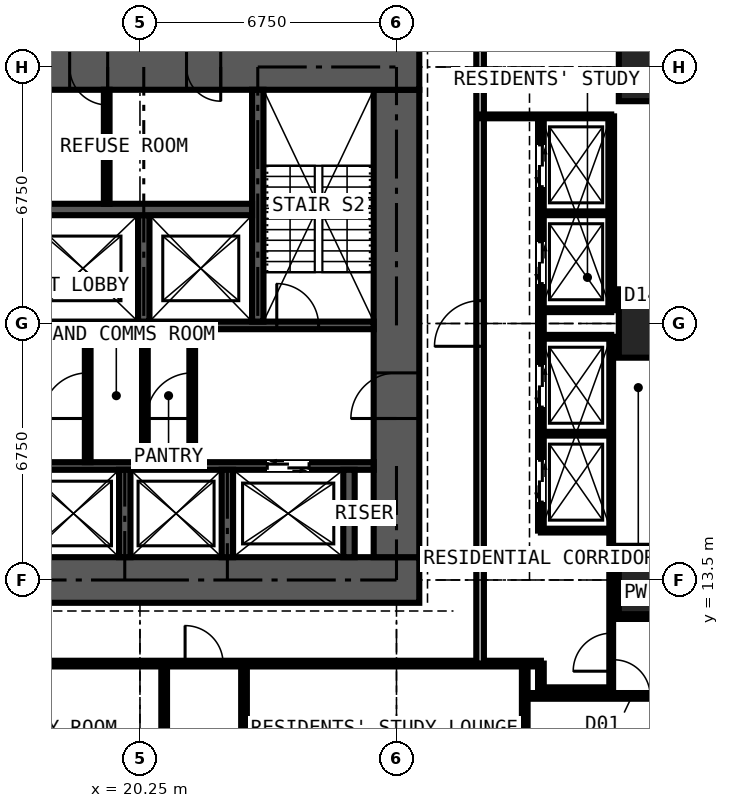
"""IFC4 building model, lengths in metres.
Left out: names, types, materials, properties, quantities, classifications, styles, units other than length and angle.
Written with IfcOpenShell. Run it as: python <this file> out.ifc"""

import sys

from ifc_helpers import new_model, si_unit, direction, frame, frame_2d, origin, origin_2d, place, context, subcontext, project, spatial, rectangle, extrude, element, fill, save


model = new_model("IFC4")
c1 = context("Model", 3, precision=1e-05, world=origin(), true_north=direction((0.0, 1.0)))
c2 = subcontext(c1, "Body", "Model", "MODEL_VIEW")
j1 = project(units=[si_unit("LENGTHUNIT", "METRE"), si_unit("PLANEANGLEUNIT", "RADIAN")], contexts=[c1])
p1 = place(None, origin())
s1 = spatial("IfcSite", under=j1, at=p1, CompositionType="ELEMENT")
p2 = place(p1, origin())
s2 = spatial("IfcBuilding", under=s1, at=p2, CompositionType="ELEMENT")
p3 = place(p2, frame((0.0, 0.0, 50.4)))
s3 = spatial("IfcBuildingStorey", under=s2, at=p3, CompositionType="ELEMENT", Elevation=50.4)
for number, where, z_axis, x_axis in (
    (1, (33.75, 13.5, 0.0), (0.0, 0.0, 1.0), (1.0, 0.0, 0.0)),
    (2, (33.75, 20.25, 0.0), (0.0, 0.0, 1.0), (1.0, 0.0, 0.0)),
    (3, (33.75, 27.0, 0.0), (0.0, 0.0, 1.0), (1.0, 0.0, 0.0)),
):
    element("IfcColumn", number, at=place(p3, frame(where, z_axis=z_axis, x_axis=x_axis)), inside=s3, PredefinedType="COLUMN", context=c2, shape_type="SweptSolid", body=[
        extrude(rectangle(XDim=1.8, YDim=1.8, at=origin_2d()), origin(), (0.0, 0.0, 1.0), 3.6),
    ])
p4 = place(p3, frame((12.9, 13.5, 0.0), z_axis=(0.0, 0.0, 1.0), x_axis=(1.0, 0.0, 0.0)))
e4 = element("IfcWall", 4, at=p4, inside=s3, PredefinedType="SHEAR", context=c2, shape_type="SweptSolid", body=[
    extrude(rectangle(XDim=14.7, YDim=1.2, at=frame_2d((7.35, 0.0))), origin(), (0.0, 0.0, 1.0), 3.6),
])
p5 = place(p3, frame((27.0, 14.1, 0.0), z_axis=(0.0, 0.0, 1.0), x_axis=(0.0, 1.0, 0.0)))
e5 = element("IfcWall", 5, at=p5, inside=s3, PredefinedType="SHEAR", context=c2, shape_type="SweptSolid", body=[
    extrude(rectangle(XDim=12.3, YDim=1.2, at=frame_2d((6.15, 0.0))), origin(), (0.0, 0.0, 1.0), 3.6),
])
p6 = place(p5, frame((3.65, 0.0, 0.0)))
e6 = element("IfcOpeningElement", 6, at=p6, cuts=e5, PredefinedType="OPENING", context=c2, shape_type="SweptSolid", body=[
    extrude(rectangle(XDim=1.2, YDim=2.2, at=frame_2d((0.6, 1.1))), frame((0.0, 0.61, 0.0), z_axis=(0.0, -1.0, 0.0), x_axis=(1.0, 0.0, 0.0)), (0.0, 0.0, 1.0), 1.22),
])
p7 = place(p3, frame((27.6, 27.0, 0.0), z_axis=(0.0, 0.0, 1.0), x_axis=(-1.0, 0.0, 0.0)))
e7 = element("IfcWall", 7, at=p7, inside=s3, PredefinedType="SHEAR", context=c2, shape_type="SweptSolid", body=[
    extrude(rectangle(XDim=14.7, YDim=1.2, at=frame_2d((7.35, 0.0))), origin(), (0.0, 0.0, 1.0), 3.6),
])
p8 = place(p7, frame((5.225, 0.0, 0.0)))
e8 = element("IfcOpeningElement", 8, at=p8, cuts=e7, PredefinedType="OPENING", context=c2, shape_type="SweptSolid", body=[
    extrude(rectangle(XDim=0.9, YDim=2.2, at=frame_2d((0.45, 1.1))), frame((0.0, 0.61, 0.0), z_axis=(0.0, -1.0, 0.0), x_axis=(1.0, 0.0, 0.0)), (0.0, 0.0, 1.0), 1.22),
])
p9 = place(p7, frame((8.2, 0.0, 0.0)))
e9 = element("IfcOpeningElement", 9, at=p9, cuts=e7, PredefinedType="OPENING", context=c2, shape_type="SweptSolid", body=[
    extrude(rectangle(XDim=1.0, YDim=2.2, at=frame_2d((0.5, 1.1))), frame((0.0, 0.61, 0.0), z_axis=(0.0, -1.0, 0.0), x_axis=(1.0, 0.0, 0.0)), (0.0, 0.0, 1.0), 1.22),
])
p10 = place(p3, frame((14.1, 16.5, 0.0), z_axis=(0.0, 0.0, 1.0), x_axis=(1.0, 0.0, 0.0)))
e10 = element("IfcWall", 10, at=p10, inside=s3, PredefinedType="SHEAR", context=c2, shape_type="SweptSolid", body=[
    extrude(rectangle(XDim=12.3, YDim=0.2, at=frame_2d((6.15, 0.0))), origin(), (0.0, 0.0, 1.0), 3.6),
])
p11 = place(p10, frame((0.9, 0.0, 0.0)))
e11 = element("IfcOpeningElement", 11, at=p11, cuts=e10, PredefinedType="OPENING", context=c2, shape_type="SweptSolid", body=[
    extrude(rectangle(XDim=1.1, YDim=2.2, at=frame_2d((0.55, 1.1))), frame((0.0, 0.11, 0.0), z_axis=(0.0, -1.0, 0.0), x_axis=(1.0, 0.0, 0.0)), (0.0, 0.0, 1.0), 0.22),
])
p12 = place(p10, frame((9.5, 0.0, 0.0)))
e12 = element("IfcOpeningElement", 12, at=p12, cuts=e10, PredefinedType="OPENING", context=c2, shape_type="SweptSolid", body=[
    extrude(rectangle(XDim=1.1, YDim=2.2, at=frame_2d((0.55, 1.1))), frame((0.0, 0.11, 0.0), z_axis=(0.0, -1.0, 0.0), x_axis=(1.0, 0.0, 0.0)), (0.0, 0.0, 1.0), 0.22),
])
p13 = place(p3, frame((14.1, 20.2, 0.0), z_axis=(0.0, 0.0, 1.0), x_axis=(1.0, 0.0, 0.0)))
e13 = element("IfcWall", 13, at=p13, inside=s3, PredefinedType="SHEAR", context=c2, shape_type="SweptSolid", body=[
    extrude(rectangle(XDim=12.3, YDim=0.2, at=frame_2d((6.15, 0.0))), origin(), (0.0, 0.0, 1.0), 3.6),
])
p14 = place(p13, frame((0.35, 0.0, 0.0)))
e14 = element("IfcOpeningElement", 14, at=p14, cuts=e13, PredefinedType="OPENING", context=c2, shape_type="SweptSolid", body=[
    extrude(rectangle(XDim=1.1, YDim=2.2, at=frame_2d((0.55, 1.1))), frame((0.0, 0.11, 0.0), z_axis=(0.0, -1.0, 0.0), x_axis=(1.0, 0.0, 0.0)), (0.0, 0.0, 1.0), 0.22),
])
p15 = place(p13, frame((9.75, 0.0, 0.0)))
e15 = element("IfcOpeningElement", 15, at=p15, cuts=e13, PredefinedType="OPENING", context=c2, shape_type="SweptSolid", body=[
    extrude(rectangle(XDim=1.1, YDim=2.2, at=frame_2d((0.55, 1.1))), frame((0.0, 0.11, 0.0), z_axis=(0.0, -1.0, 0.0), x_axis=(1.0, 0.0, 0.0)), (0.0, 0.0, 1.0), 0.22),
])
p16 = place(p3, frame((23.35, 20.3, 0.0), z_axis=(0.0, 0.0, 1.0), x_axis=(0.0, 1.0, 0.0)))
e16 = element("IfcWall", 16, at=p16, inside=s3, PredefinedType="SHEAR", context=c2, shape_type="SweptSolid", body=[
    extrude(rectangle(XDim=6.1, YDim=0.3, at=frame_2d((3.05, 0.0))), origin(), (0.0, 0.0, 1.0), 3.6),
])
p17 = place(p3, frame((20.35, 20.3, 0.0), z_axis=(0.0, 0.0, 1.0), x_axis=(0.0, 1.0, 0.0)))
e17 = element("IfcWall", 17, at=p17, inside=s3, PredefinedType="SHEAR", context=c2, shape_type="SweptSolid", body=[
    extrude(rectangle(XDim=2.8, YDim=0.3, at=frame_2d((1.4, 0.0))), origin(), (0.0, 0.0, 1.0), 3.6),
])
p18 = place(p3, frame((17.3, 23.25, 0.0), z_axis=(0.0, 0.0, 1.0), x_axis=(1.0, 0.0, 0.0)))
e18 = element("IfcWall", 18, at=p18, inside=s3, PredefinedType="SHEAR", context=c2, shape_type="SweptSolid", body=[
    extrude(rectangle(XDim=5.9, YDim=0.3, at=frame_2d((2.95, 0.0))), origin(), (0.0, 0.0, 1.0), 3.6),
])
for number, where, z_axis, x_axis in (
    (19, (19.85, 14.1, 0.0), (0.0, 0.0, 1.0), (0.0, 1.0, 0.0)),
    (20, (22.55, 14.1, 0.0), (0.0, 0.0, 1.0), (0.0, 1.0, 0.0)),
    (21, (25.75, 14.1, 0.0), (0.0, 0.0, 1.0), (0.0, 1.0, 0.0)),
):
    element("IfcWall", number, at=place(p3, frame(where, z_axis=z_axis, x_axis=x_axis)), inside=s3, PredefinedType="SHEAR", context=c2, shape_type="SweptSolid", body=[
        extrude(rectangle(XDim=2.3, YDim=0.3, at=frame_2d((1.15, 0.0))), origin(), (0.0, 0.0, 1.0), 3.6),
    ])
p19 = place(p3, frame((18.875, 16.6, 0.0), z_axis=(0.0, 0.0, 1.0), x_axis=(0.0, 1.0, 0.0)))
e22 = element("IfcWall", 22, at=p19, inside=s3, PredefinedType="PARTITIONING", context=c2, shape_type="SweptSolid", body=[
    extrude(rectangle(XDim=3.5, YDim=0.15, at=frame_2d((1.75, 0.0))), origin(), (0.0, 0.0, 1.0), 3.375),
])
p20 = place(p19, frame((1.15, 0.0, 0.0)))
e23 = element("IfcOpeningElement", 23, at=p20, cuts=e22, PredefinedType="OPENING", context=c2, shape_type="SweptSolid", body=[
    extrude(rectangle(XDim=1.2, YDim=2.2, at=frame_2d((0.6, 1.1))), frame((0.0, 0.085, 0.0), z_axis=(0.0, -1.0, 0.0), x_axis=(1.0, 0.0, 0.0)), (0.0, 0.0, 1.0), 0.17),
])
p21 = place(p3, frame((21.625, 16.6, 0.0), z_axis=(0.0, 0.0, 1.0), x_axis=(0.0, 1.0, 0.0)))
e24 = element("IfcWall", 24, at=p21, inside=s3, PredefinedType="PARTITIONING", context=c2, shape_type="SweptSolid", body=[
    extrude(rectangle(XDim=3.5, YDim=0.15, at=frame_2d((1.75, 0.0))), origin(), (0.0, 0.0, 1.0), 3.375),
])
p22 = place(p21, frame((1.15, 0.0, 0.0)))
e25 = element("IfcOpeningElement", 25, at=p22, cuts=e24, PredefinedType="OPENING", context=c2, shape_type="SweptSolid", body=[
    extrude(rectangle(XDim=1.2, YDim=2.2, at=frame_2d((0.6, 1.1))), frame((0.0, 0.085, 0.0), z_axis=(0.0, -1.0, 0.0), x_axis=(1.0, 0.0, 0.0)), (0.0, 0.0, 1.0), 0.17),
])
p23 = place(p3, frame((20.38, 16.6, 0.0), z_axis=(0.0, 0.0, 1.0), x_axis=(0.0, 1.0, 0.0)))
e26 = element("IfcWall", 26, at=p23, inside=s3, PredefinedType="PARTITIONING", context=c2, shape_type="SweptSolid", body=[
    extrude(rectangle(XDim=3.5, YDim=0.15, at=frame_2d((1.75, 0.0))), origin(), (0.0, 0.0, 1.0), 3.375),
])
p24 = place(p3, frame((19.375, 23.4, 0.0), z_axis=(0.0, 0.0, 1.0), x_axis=(0.0, 1.0, 0.0)))
e27 = element("IfcWall", 27, at=p24, inside=s3, PredefinedType="PARTITIONING", context=c2, shape_type="SweptSolid", body=[
    extrude(rectangle(XDim=3.0, YDim=0.15, at=frame_2d((1.5, 0.0))), origin(), (0.0, 0.0, 1.0), 3.375),
])
p25 = place(p3, frame((10.125, 11.3, 0.0), z_axis=(0.0, 0.0, 1.0), x_axis=(1.0, 0.0, 0.0)))
e28 = element("IfcWall", 28, at=p25, inside=s3, PredefinedType="PARTITIONING", context=c2, shape_type="SweptSolid", body=[
    extrude(rectangle(XDim=20.675, YDim=0.15, at=frame_2d((10.337, 0.0))), origin(), (0.0, 0.0, 1.0), 3.375),
])
p26 = place(p25, frame((1.775, 0.0, 0.0)))
e29 = element("IfcOpeningElement", 29, at=p26, cuts=e28, PredefinedType="OPENING", context=c2, shape_type="SweptSolid", body=[
    extrude(rectangle(XDim=1.0, YDim=2.2, at=frame_2d((0.5, 1.1))), frame((0.0, 0.085, 0.0), z_axis=(0.0, -1.0, 0.0), x_axis=(1.0, 0.0, 0.0)), (0.0, 0.0, 1.0), 0.17),
])
p27 = place(p25, frame((11.312, 0.0, 0.0)))
e30 = element("IfcOpeningElement", 30, at=p27, cuts=e28, PredefinedType="OPENING", context=c2, shape_type="SweptSolid", body=[
    extrude(rectangle(XDim=1.0, YDim=2.2, at=frame_2d((0.5, 1.1))), frame((0.0, 0.085, 0.0), z_axis=(0.0, -1.0, 0.0), x_axis=(1.0, 0.0, 0.0)), (0.0, 0.0, 1.0), 0.17),
])
for number, where, z_axis, x_axis in (
    (31, (20.887, 5.65, 0.0), (0.0, 0.0, 1.0), (0.0, 1.0, 0.0)),
    (32, (22.988, 5.65, 0.0), (0.0, 0.0, 1.0), (0.0, 1.0, 0.0)),
):
    element("IfcWall", number, at=place(p3, frame(where, z_axis=z_axis, x_axis=x_axis)), inside=s3, PredefinedType="PARTITIONING", context=c2, shape_type="SweptSolid", body=[
        extrude(rectangle(XDim=5.65, YDim=0.15, at=frame_2d((2.825, 0.0))), origin(), (0.0, 0.0, 1.0), 3.375),
    ])
p28 = place(p3, frame((29.2, 11.3, 0.0), z_axis=(0.0, 0.0, 1.0), x_axis=(0.0, 1.0, 0.0)))
e33 = element("IfcWall", 33, at=p28, inside=s3, PredefinedType="PARTITIONING", context=c2, shape_type="SweptSolid", body=[
    extrude(rectangle(XDim=17.9, YDim=0.2, at=frame_2d((8.95, 0.0))), origin(), (0.0, 0.0, 1.0), 3.375),
])
p29 = place(p28, frame((8.35, 0.0, 0.0)))
e34 = element("IfcOpeningElement", 34, at=p29, cuts=e33, PredefinedType="OPENING", context=c2, shape_type="SweptSolid", body=[
    extrude(rectangle(XDim=1.2, YDim=2.2, at=frame_2d((0.6, 1.1))), frame((0.0, 0.11, 0.0), z_axis=(0.0, -1.0, 0.0), x_axis=(1.0, 0.0, 0.0)), (0.0, 0.0, 1.0), 0.22),
])
p30 = place(p3, frame((29.2, 25.7, 0.0), z_axis=(0.0, 0.0, 1.0), x_axis=(1.0, 0.0, 0.0)))
e35 = element("IfcWall", 35, at=p30, inside=s3, PredefinedType="SHEAR", context=c2, shape_type="SweptSolid", body=[
    extrude(rectangle(XDim=3.45, YDim=0.1, at=frame_2d((1.725, 0.0))), origin(), (0.0, 0.0, 1.0), 3.375),
])
p31 = place(p3, frame((30.375, -0.734, 0.0), z_axis=(0.0, 0.0, 1.0), x_axis=(0.0, 1.0, 0.0)))
e36 = element("IfcWall", 36, at=p31, inside=s3, PredefinedType="PARTITIONING", context=c2, shape_type="SweptSolid", body=[
    extrude(rectangle(XDim=12.034, YDim=0.15, at=frame_2d((6.017, 0.0))), origin(), (0.0, 0.0, 1.0), 3.375),
])
p32 = place(p31, frame((5.134, 0.0, 0.0)))
e37 = element("IfcOpeningElement", 37, at=p32, cuts=e36, PredefinedType="OPENING", context=c2, shape_type="SweptSolid", body=[
    extrude(rectangle(XDim=1.0, YDim=2.2, at=frame_2d((0.5, 1.1))), frame((0.0, 0.085, 0.0), z_axis=(0.0, -1.0, 0.0), x_axis=(1.0, 0.0, 0.0)), (0.0, 0.0, 1.0), 0.17),
])
p33 = place(p3, frame((30.375, 10.45, 0.0), z_axis=(0.0, 0.0, 1.0), x_axis=(1.0, 0.0, 0.0)))
e38 = element("IfcWall", 38, at=p33, inside=s3, PredefinedType="PARTITIONING", context=c2, shape_type="SweptSolid", body=[
    extrude(rectangle(XDim=4.475, YDim=0.15, at=frame_2d((2.238, 0.0))), origin(), (0.0, 0.0, 1.0), 3.375),
])
p34 = place(p33, frame((2.35, 0.0, 0.0)))
e39 = element("IfcOpeningElement", 39, at=p34, cuts=e38, PredefinedType="OPENING", context=c2, shape_type="SweptSolid", body=[
    extrude(rectangle(XDim=0.95, YDim=2.2, at=frame_2d((0.475, 1.1))), frame((0.0, 0.085, 0.0), z_axis=(0.0, -1.0, 0.0), x_axis=(1.0, 0.0, 0.0)), (0.0, 0.0, 1.0), 0.17),
])
p35 = place(p3, frame((30.8, 10.6, 0.0), z_axis=(0.0, 0.0, 1.0), x_axis=(0.0, 1.0, 0.0)))
e40 = element("IfcWall", 40, at=p35, inside=s3, PredefinedType="PARTITIONING", context=c2, shape_type="SweptSolid", body=[
    extrude(rectangle(XDim=0.7, YDim=0.15, at=frame_2d((0.35, 0.0))), origin(), (0.0, 0.0, 1.0), 3.375),
])
p36 = place(p3, frame((30.8, 10.6, 0.0), z_axis=(0.0, 0.0, 1.0), x_axis=(1.0, 0.0, 0.0)))
e41 = element("IfcWall", 41, at=p36, inside=s3, PredefinedType="PARTITIONING", context=c2, shape_type="SweptSolid", body=[
    extrude(rectangle(XDim=1.85, YDim=0.15, at=frame_2d((0.925, 0.0))), origin(), (0.0, 0.0, 1.0), 3.375),
])
p37 = place(p3, frame((30.8, 14.8, 0.0), z_axis=(0.0, 0.0, 1.0), x_axis=(0.0, 1.0, 0.0)))
e42 = element("IfcWall", 42, at=p37, inside=s3, PredefinedType="PARTITIONING", context=c2, shape_type="SweptSolid", body=[
    extrude(rectangle(XDim=10.9, YDim=0.15, at=frame_2d((5.45, 0.0))), origin(), (0.0, 0.0, 1.0), 3.375),
])
p38 = place(p37, frame((0.75, 0.0, 0.0)))
e43 = element("IfcOpeningElement", 43, at=p38, cuts=e42, PredefinedType="OPENING", context=c2, shape_type="SweptSolid", body=[
    extrude(rectangle(XDim=1.1, YDim=2.2, at=frame_2d((0.55, 1.1))), frame((0.0, 0.085, 0.0), z_axis=(0.0, -1.0, 0.0), x_axis=(1.0, 0.0, 0.0)), (0.0, 0.0, 1.0), 0.17),
])
p39 = place(p37, frame((3.25, 0.0, 0.0)))
e44 = element("IfcOpeningElement", 44, at=p39, cuts=e42, PredefinedType="OPENING", context=c2, shape_type="SweptSolid", body=[
    extrude(rectangle(XDim=1.1, YDim=2.2, at=frame_2d((0.55, 1.1))), frame((0.0, 0.085, 0.0), z_axis=(0.0, -1.0, 0.0), x_axis=(1.0, 0.0, 0.0)), (0.0, 0.0, 1.0), 0.17),
])
p40 = place(p37, frame((6.5, 0.0, 0.0)))
e45 = element("IfcOpeningElement", 45, at=p40, cuts=e42, PredefinedType="OPENING", context=c2, shape_type="SweptSolid", body=[
    extrude(rectangle(XDim=1.1, YDim=2.2, at=frame_2d((0.55, 1.1))), frame((0.0, 0.085, 0.0), z_axis=(0.0, -1.0, 0.0), x_axis=(1.0, 0.0, 0.0)), (0.0, 0.0, 1.0), 0.17),
])
p41 = place(p37, frame((9.05, 0.0, 0.0)))
e46 = element("IfcOpeningElement", 46, at=p41, cuts=e42, PredefinedType="OPENING", context=c2, shape_type="SweptSolid", body=[
    extrude(rectangle(XDim=1.1, YDim=2.2, at=frame_2d((0.55, 1.1))), frame((0.0, 0.085, 0.0), z_axis=(0.0, -1.0, 0.0), x_axis=(1.0, 0.0, 0.0)), (0.0, 0.0, 1.0), 0.17),
])
for number, where, z_axis, x_axis in (
    (47, (30.8, 14.8, 0.0), (0.0, 0.0, 1.0), (1.0, 0.0, 0.0)),
    (48, (30.8, 17.35, 0.0), (0.0, 0.0, 1.0), (1.0, 0.0, 0.0)),
    (49, (30.8, 19.9, 0.0), (0.0, 0.0, 1.0), (1.0, 0.0, 0.0)),
    (50, (30.8, 20.6, 0.0), (0.0, 0.0, 1.0), (1.0, 0.0, 0.0)),
    (51, (30.8, 23.15, 0.0), (0.0, 0.0, 1.0), (1.0, 0.0, 0.0)),
):
    element("IfcWall", number, at=place(p3, frame(where, z_axis=z_axis, x_axis=x_axis)), inside=s3, PredefinedType="SHEAR", context=c2, shape_type="SweptSolid", body=[
        extrude(rectangle(XDim=1.85, YDim=0.1, at=frame_2d((0.925, 0.0))), origin(), (0.0, 0.0, 1.0), 3.375),
    ])
p42 = place(p3, frame((32.65, 10.6, 0.0), z_axis=(0.0, 0.0, 1.0), x_axis=(0.0, 1.0, 0.0)))
e52 = element("IfcWall", 52, at=p42, inside=s3, PredefinedType="SHEAR", context=c2, shape_type="SweptSolid", body=[
    extrude(rectangle(XDim=9.3, YDim=0.1, at=frame_2d((4.65, 0.0))), origin(), (0.0, 0.0, 1.0), 3.375),
])
p43 = place(p42, frame((0.5, 0.0, 0.0)))
e53 = element("IfcOpeningElement", 53, at=p43, cuts=e52, PredefinedType="OPENING", context=c2, shape_type="SweptSolid", body=[
    extrude(rectangle(XDim=1.0, YDim=2.2, at=frame_2d((0.5, 1.1))), frame((0.0, 0.06, 0.0), z_axis=(0.0, -1.0, 0.0), x_axis=(1.0, 0.0, 0.0)), (0.0, 0.0, 1.0), 0.12),
])
p44 = place(p3, frame((32.65, 12.55, 0.0), z_axis=(0.0, 0.0, 1.0), x_axis=(1.0, 0.0, 0.0)))
e54 = element("IfcWall", 54, at=p44, inside=s3, PredefinedType="PARTITIONING", context=c2, shape_type="SweptSolid", body=[
    extrude(rectangle(XDim=2.2, YDim=0.15, at=frame_2d((1.1, 0.0))), origin(), (0.0, 0.0, 1.0), 3.375),
])
p45 = place(p3, frame((32.65, 20.6, 0.0), z_axis=(0.0, 0.0, 1.0), x_axis=(0.0, 1.0, 0.0)))
e55 = element("IfcWall", 55, at=p45, inside=s3, PredefinedType="PARTITIONING", context=c2, shape_type="SweptSolid", body=[
    extrude(rectangle(XDim=5.1, YDim=0.15, at=frame_2d((2.55, 0.0))), origin(), (0.0, 0.0, 1.0), 3.375),
])
p46 = place(p12, origin())
e56 = element("IfcDoor", 56, at=p46, inside=s3, OperationType="DOUBLE_DOOR_SLIDING", PredefinedType="DOOR", context=c2, shape_type="SweptSolid", body=[
    extrude(rectangle(XDim=1.1, YDim=2.2, at=frame_2d((0.55, 1.1))), frame((0.0, 0.025, 0.0), z_axis=(0.0, -1.0, 0.0), x_axis=(1.0, 0.0, 0.0)), (0.0, 0.0, 1.0), 0.05),
])
fill(e12, e56)
p47 = place(p6, origin())
e57 = element("IfcDoor", 57, at=p47, inside=s3, OperationType="DOUBLE_DOOR_SINGLE_SWING", PredefinedType="DOOR", context=c2, shape_type="SweptSolid", body=[
    extrude(rectangle(XDim=1.2, YDim=2.2, at=frame_2d((0.6, 1.1))), frame((0.0, 0.025, 0.0), z_axis=(0.0, -1.0, 0.0), x_axis=(1.0, 0.0, 0.0)), (0.0, 0.0, 1.0), 0.05),
])
fill(e6, e57)
p48 = place(p20, origin())
e58 = element("IfcDoor", 58, at=p48, inside=s3, OperationType="DOUBLE_DOOR_SINGLE_SWING", PredefinedType="DOOR", context=c2, shape_type="SweptSolid", body=[
    extrude(rectangle(XDim=1.2, YDim=2.2, at=frame_2d((0.6, 1.1))), frame((0.0, 0.025, 0.0), z_axis=(0.0, -1.0, 0.0), x_axis=(1.0, 0.0, 0.0)), (0.0, 0.0, 1.0), 0.05),
])
fill(e23, e58)
p49 = place(p22, origin())
e59 = element("IfcDoor", 59, at=p49, inside=s3, OperationType="DOUBLE_DOOR_SINGLE_SWING", PredefinedType="DOOR", context=c2, shape_type="SweptSolid", body=[
    extrude(rectangle(XDim=1.2, YDim=2.2, at=frame_2d((0.6, 1.1))), frame((0.0, 0.025, 0.0), z_axis=(0.0, -1.0, 0.0), x_axis=(1.0, 0.0, 0.0)), (0.0, 0.0, 1.0), 0.05),
])
fill(e25, e59)
p50 = place(p8, origin())
e60 = element("IfcDoor", 60, at=p50, inside=s3, OperationType="SINGLE_SWING_LEFT", PredefinedType="DOOR", context=c2, shape_type="SweptSolid", body=[
    extrude(rectangle(XDim=0.9, YDim=2.2, at=frame_2d((0.45, 1.1))), frame((0.0, 0.4, 0.0), z_axis=(0.0, -1.0, 0.0), x_axis=(1.0, 0.0, 0.0)), (0.0, 0.0, 1.0), 0.8),
])
fill(e8, e60)
p51 = place(p9, origin())
e61 = element("IfcDoor", 61, at=p51, inside=s3, OperationType="SINGLE_SWING_LEFT", PredefinedType="DOOR", context=c2, shape_type="SweptSolid", body=[
    extrude(rectangle(XDim=1.0, YDim=2.2, at=frame_2d((0.5, 1.1))), frame((0.0, 0.025, 0.0), z_axis=(0.0, -1.0, 0.0), x_axis=(1.0, 0.0, 0.0)), (0.0, 0.0, 1.0), 0.05),
])
fill(e9, e61)
p52 = place(p15, origin())
e62 = element("IfcDoor", 62, at=p52, inside=s3, OperationType="SINGLE_SWING_LEFT", PredefinedType="DOOR", context=c2, shape_type="SweptSolid", body=[
    extrude(rectangle(XDim=1.1, YDim=2.2, at=frame_2d((0.55, 1.1))), frame((0.0, 0.025, 0.0), z_axis=(0.0, -1.0, 0.0), x_axis=(1.0, 0.0, 0.0)), (0.0, 0.0, 1.0), 0.05),
])
fill(e15, e62)
p53 = place(p27, origin())
e63 = element("IfcDoor", 63, at=p53, inside=s3, OperationType="SINGLE_SWING_LEFT", PredefinedType="DOOR", context=c2, shape_type="SweptSolid", body=[
    extrude(rectangle(XDim=1.0, YDim=2.2, at=frame_2d((0.5, 1.1))), frame((0.0, 0.025, 0.0), z_axis=(0.0, -1.0, 0.0), x_axis=(1.0, 0.0, 0.0)), (0.0, 0.0, 1.0), 0.05),
])
fill(e30, e63)
p54 = place(p43, origin())
e64 = element("IfcDoor", 64, at=p54, inside=s3, OperationType="SINGLE_SWING_LEFT", PredefinedType="DOOR", context=c2, shape_type="SweptSolid", body=[
    extrude(rectangle(XDim=1.0, YDim=2.2, at=frame_2d((0.5, 1.1))), frame((0.0, 0.025, 0.0), z_axis=(0.0, -1.0, 0.0), x_axis=(1.0, 0.0, 0.0)), (0.0, 0.0, 1.0), 0.05),
])
fill(e53, e64)
p55 = place(p34, origin())
e65 = element("IfcDoor", 65, at=p55, inside=s3, OperationType="SINGLE_SWING_LEFT", PredefinedType="DOOR", context=c2, shape_type="SweptSolid", body=[
    extrude(rectangle(XDim=0.95, YDim=2.2, at=frame_2d((0.475, 1.1))), frame((0.0, 0.025, 0.0), z_axis=(0.0, -1.0, 0.0), x_axis=(1.0, 0.0, 0.0)), (0.0, 0.0, 1.0), 0.05),
])
fill(e39, e65)
p56 = place(p38, origin())
e66 = element("IfcDoor", 66, at=p56, inside=s3, OperationType="DOUBLE_DOOR_SLIDING", PredefinedType="DOOR", context=c2, shape_type="SweptSolid", body=[
    extrude(rectangle(XDim=1.1, YDim=2.2, at=frame_2d((0.55, 1.1))), frame((0.0, 0.025, 0.0), z_axis=(0.0, -1.0, 0.0), x_axis=(1.0, 0.0, 0.0)), (0.0, 0.0, 1.0), 0.05),
])
fill(e43, e66)
p57 = place(p39, origin())
e67 = element("IfcDoor", 67, at=p57, inside=s3, OperationType="DOUBLE_DOOR_SLIDING", PredefinedType="DOOR", context=c2, shape_type="SweptSolid", body=[
    extrude(rectangle(XDim=1.1, YDim=2.2, at=frame_2d((0.55, 1.1))), frame((0.0, 0.025, 0.0), z_axis=(0.0, -1.0, 0.0), x_axis=(1.0, 0.0, 0.0)), (0.0, 0.0, 1.0), 0.05),
])
fill(e44, e67)
p58 = place(p40, origin())
e68 = element("IfcDoor", 68, at=p58, inside=s3, OperationType="DOUBLE_DOOR_SLIDING", PredefinedType="DOOR", context=c2, shape_type="SweptSolid", body=[
    extrude(rectangle(XDim=1.1, YDim=2.2, at=frame_2d((0.55, 1.1))), frame((0.0, 0.025, 0.0), z_axis=(0.0, -1.0, 0.0), x_axis=(1.0, 0.0, 0.0)), (0.0, 0.0, 1.0), 0.05),
])
fill(e45, e68)
p59 = place(p41, origin())
e69 = element("IfcDoor", 69, at=p59, inside=s3, OperationType="DOUBLE_DOOR_SLIDING", PredefinedType="DOOR", context=c2, shape_type="SweptSolid", body=[
    extrude(rectangle(XDim=1.1, YDim=2.2, at=frame_2d((0.55, 1.1))), frame((0.0, 0.025, 0.0), z_axis=(0.0, -1.0, 0.0), x_axis=(1.0, 0.0, 0.0)), (0.0, 0.0, 1.0), 0.05),
])
fill(e46, e69)
p60 = place(p29, origin())
e70 = element("IfcDoor", 70, at=p60, inside=s3, OperationType="DOUBLE_DOOR_SINGLE_SWING", PredefinedType="DOOR", context=c2, shape_type="SweptSolid", body=[
    extrude(rectangle(XDim=1.2, YDim=2.2, at=frame_2d((0.6, 1.1))), frame((0.0, 0.025, 0.0), z_axis=(0.0, -1.0, 0.0), x_axis=(1.0, 0.0, 0.0)), (0.0, 0.0, 1.0), 0.05),
])
fill(e34, e70)
save(model, sys.argv[1])
